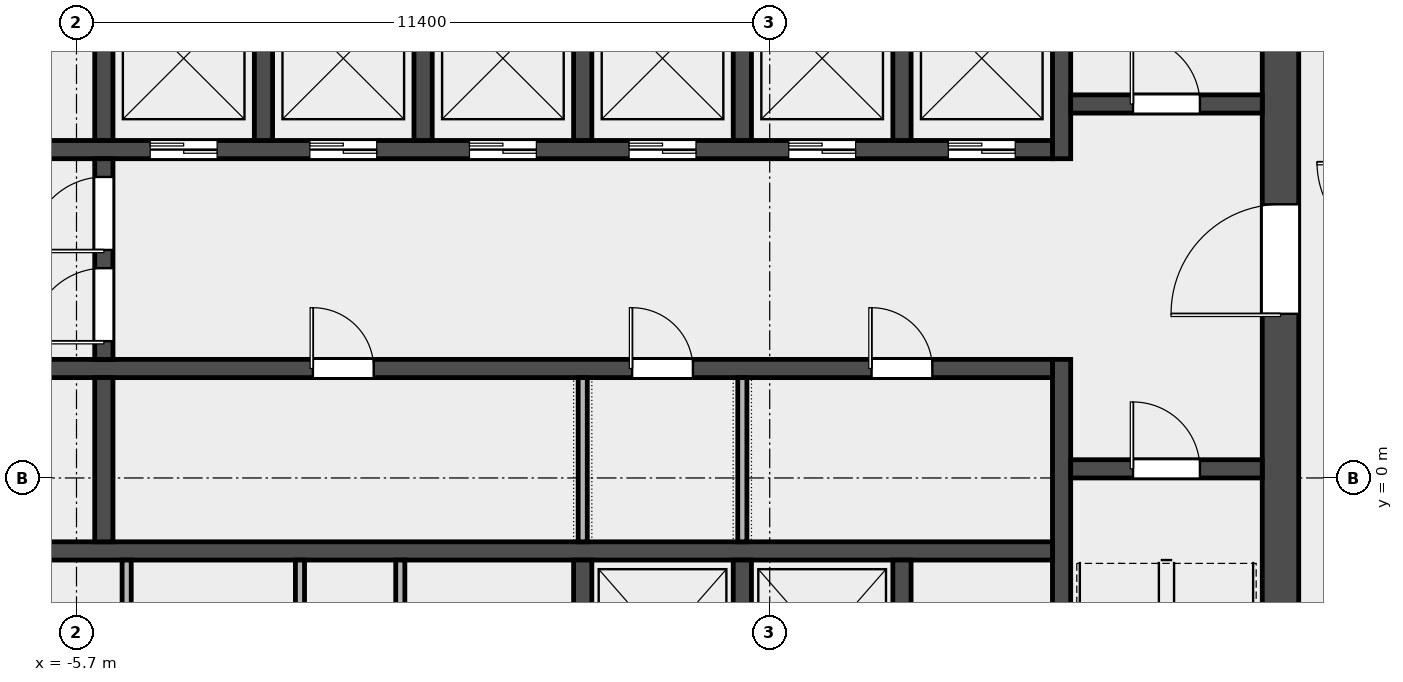
"""IFC4 building model, lengths in metres.
Left out: names, types, materials, properties, quantities, classifications, styles, units other than length and angle.
Written with IfcOpenShell. Run it as: python <this file> out.ifc"""

import sys

from ifc_helpers import new_model, si_unit, direction, frame, frame_2d, origin, place, context, subcontext, project, spatial, rectangle, extrude, element, fill, save


model = new_model("IFC4")
c1 = context("Model", 3, precision=1e-05, world=origin(), true_north=direction((0.0, 1.0)))
c2 = subcontext(c1, "Body", "Model", "MODEL_VIEW")
j1 = project(units=[si_unit("LENGTHUNIT", "METRE"), si_unit("PLANEANGLEUNIT", "RADIAN")], contexts=[c1])
p1 = place(None, origin())
s1 = spatial("IfcSite", under=j1, at=p1, CompositionType="ELEMENT")
p2 = place(p1, origin())
s2 = spatial("IfcBuilding", under=s1, at=p2, CompositionType="ELEMENT")
p3 = place(p2, frame((0.0, 0.0, 295.4)))
s3 = spatial("IfcBuildingStorey", under=s2, at=p3, CompositionType="ELEMENT", Elevation=295.4)
p4 = place(p3, frame((14.1, -6.6, 0.0), z_axis=(0.0, 0.0, 1.0), x_axis=(0.0, 1.0, 0.0)))
e1 = element("IfcWall", 1, at=p4, inside=s3, PredefinedType="SHEAR", context=c2, shape_type="SweptSolid", body=[
    extrude(rectangle(XDim=19.5, YDim=0.6, at=frame_2d((9.75, 0.0))), origin(), (0.0, 0.0, 1.0), 3.7),
])
p5 = place(p4, frame((9.3, 0.0, 0.0)))
e2 = element("IfcOpeningElement", 2, at=p5, cuts=e1, PredefinedType="OPENING", context=c2, shape_type="SweptSolid", body=[
    extrude(rectangle(XDim=1.8, YDim=2.1, at=frame_2d((0.9, 1.05))), frame((0.0, 0.312, 0.0), z_axis=(0.0, -1.0, 0.0), x_axis=(1.0, 0.0, 0.0)), (0.0, 0.0, 1.0), 0.624),
])
p6 = place(p3, frame((10.5, -6.6, 0.0), z_axis=(0.0, 0.0, 1.0), x_axis=(0.0, 1.0, 0.0)))
e3 = element("IfcWall", 3, at=p6, inside=s3, PredefinedType="SHEAR", context=c2, shape_type="SweptSolid", body=[
    extrude(rectangle(XDim=8.55, YDim=0.3, at=frame_2d((4.275, 0.0))), origin(), (0.0, 0.0, 1.0), 3.7),
])
p7 = place(p3, frame((10.5, 5.25, 0.0), z_axis=(0.0, 0.0, 1.0), x_axis=(0.0, 1.0, 0.0)))
e4 = element("IfcWall", 4, at=p7, inside=s3, PredefinedType="SHEAR", context=c2, shape_type="SweptSolid", body=[
    extrude(rectangle(XDim=7.65, YDim=0.3, at=frame_2d((3.825, 0.0))), origin(), (0.0, 0.0, 1.0), 3.7),
])
p8 = place(p3, frame((10.65, 0.15, 0.0), z_axis=(0.0, 0.0, 1.0), x_axis=(1.0, 0.0, 0.0)))
e5 = element("IfcWall", 5, at=p8, inside=s3, PredefinedType="SOLIDWALL", context=c2, shape_type="SweptSolid", body=[
    extrude(rectangle(XDim=3.15, YDim=0.3, at=frame_2d((1.575, 0.0))), origin(), (0.0, 0.0, 1.0), 3.7),
])
p9 = place(p8, frame((1.025, 0.0, 0.0)))
e6 = element("IfcOpeningElement", 6, at=p9, cuts=e5, PredefinedType="OPENING", context=c2, shape_type="SweptSolid", body=[
    extrude(rectangle(XDim=1.1, YDim=2.1, at=frame_2d((0.55, 1.05))), frame((0.0, 0.162, 0.0), z_axis=(0.0, -1.0, 0.0), x_axis=(1.0, 0.0, 0.0)), (0.0, 0.0, 1.0), 0.324),
])
p10 = place(p3, frame((10.65, 6.15, 0.0), z_axis=(0.0, 0.0, 1.0), x_axis=(1.0, 0.0, 0.0)))
e7 = element("IfcWall", 7, at=p10, inside=s3, PredefinedType="SOLIDWALL", context=c2, shape_type="SweptSolid", body=[
    extrude(rectangle(XDim=3.15, YDim=0.3, at=frame_2d((1.575, 0.0))), origin(), (0.0, 0.0, 1.0), 3.7),
])
p11 = place(p10, frame((1.025, 0.0, 0.0)))
e8 = element("IfcOpeningElement", 8, at=p11, cuts=e7, PredefinedType="OPENING", context=c2, shape_type="SweptSolid", body=[
    extrude(rectangle(XDim=1.1, YDim=2.1, at=frame_2d((0.55, 1.05))), frame((0.0, 0.162, 0.0), z_axis=(0.0, -1.0, 0.0), x_axis=(1.0, 0.0, 0.0)), (0.0, 0.0, 1.0), 0.324),
])
p12 = place(p3, frame((-10.35, -1.2, 0.0), z_axis=(0.0, 0.0, 1.0), x_axis=(1.0, 0.0, 0.0)))
e9 = element("IfcWall", 9, at=p12, inside=s3, PredefinedType="SOLIDWALL", context=c2, shape_type="SweptSolid", body=[
    extrude(rectangle(XDim=20.7, YDim=0.3, at=frame_2d((10.35, 0.0))), origin(), (0.0, 0.0, 1.0), 3.7),
])
p13 = place(p3, frame((-10.35, 1.8, 0.0), z_axis=(0.0, 0.0, 1.0), x_axis=(1.0, 0.0, 0.0)))
e10 = element("IfcWall", 10, at=p13, inside=s3, PredefinedType="SOLIDWALL", context=c2, shape_type="SweptSolid", body=[
    extrude(rectangle(XDim=20.7, YDim=0.3, at=frame_2d((10.35, 0.0))), origin(), (0.0, 0.0, 1.0), 3.7),
])
p14 = place(p13, frame((0.512, 0.0, 0.0)))
e11 = element("IfcOpeningElement", 11, at=p14, cuts=e10, PredefinedType="OPENING", context=c2, shape_type="SweptSolid", body=[
    extrude(rectangle(XDim=1.3, YDim=2.1, at=frame_2d((0.65, 1.05))), frame((0.0, 0.162, 0.0), z_axis=(0.0, -1.0, 0.0), x_axis=(1.0, 0.0, 0.0)), (0.0, 0.0, 1.0), 0.324),
])
p15 = place(p13, frame((8.538, 0.0, 0.0)))
e12 = element("IfcOpeningElement", 12, at=p15, cuts=e10, PredefinedType="OPENING", context=c2, shape_type="SweptSolid", body=[
    extrude(rectangle(XDim=1.0, YDim=2.1, at=frame_2d((0.5, 1.05))), frame((0.0, 0.162, 0.0), z_axis=(0.0, -1.0, 0.0), x_axis=(1.0, 0.0, 0.0)), (0.0, 0.0, 1.0), 0.324),
])
p16 = place(p13, frame((13.788, 0.0, 0.0)))
e13 = element("IfcOpeningElement", 13, at=p16, cuts=e10, PredefinedType="OPENING", context=c2, shape_type="SweptSolid", body=[
    extrude(rectangle(XDim=1.0, YDim=2.1, at=frame_2d((0.5, 1.05))), frame((0.0, 0.162, 0.0), z_axis=(0.0, -1.0, 0.0), x_axis=(1.0, 0.0, 0.0)), (0.0, 0.0, 1.0), 0.324),
])
p17 = place(p13, frame((17.725, 0.0, 0.0)))
e14 = element("IfcOpeningElement", 14, at=p17, cuts=e10, PredefinedType="OPENING", context=c2, shape_type="SweptSolid", body=[
    extrude(rectangle(XDim=1.0, YDim=2.1, at=frame_2d((0.5, 1.05))), frame((0.0, 0.162, 0.0), z_axis=(0.0, -1.0, 0.0), x_axis=(1.0, 0.0, 0.0)), (0.0, 0.0, 1.0), 0.324),
])
p18 = place(p3, frame((-10.35, 5.4, 0.0), z_axis=(0.0, 0.0, 1.0), x_axis=(1.0, 0.0, 0.0)))
e15 = element("IfcWall", 15, at=p18, inside=s3, PredefinedType="SOLIDWALL", context=c2, shape_type="SweptSolid", body=[
    extrude(rectangle(XDim=20.7, YDim=0.3, at=frame_2d((10.35, 0.0))), origin(), (0.0, 0.0, 1.0), 3.7),
])
p19 = place(p18, frame((0.512, 0.0, 0.0)))
e16 = element("IfcOpeningElement", 16, at=p19, cuts=e15, PredefinedType="OPENING", context=c2, shape_type="SweptSolid", body=[
    extrude(rectangle(XDim=1.3, YDim=2.1, at=frame_2d((0.65, 1.05))), frame((0.0, 0.162, 0.0), z_axis=(0.0, -1.0, 0.0), x_axis=(1.0, 0.0, 0.0)), (0.0, 0.0, 1.0), 0.324),
])
p20 = place(p18, frame((5.863, 0.0, 0.0)))
e17 = element("IfcOpeningElement", 17, at=p20, cuts=e15, PredefinedType="OPENING", context=c2, shape_type="SweptSolid", body=[
    extrude(rectangle(XDim=1.1, YDim=2.1, at=frame_2d((0.55, 1.05))), frame((0.0, 0.162, 0.0), z_axis=(0.0, -1.0, 0.0), x_axis=(1.0, 0.0, 0.0)), (0.0, 0.0, 1.0), 0.324),
])
p21 = place(p18, frame((8.488, 0.0, 0.0)))
e18 = element("IfcOpeningElement", 18, at=p21, cuts=e15, PredefinedType="OPENING", context=c2, shape_type="SweptSolid", body=[
    extrude(rectangle(XDim=1.1, YDim=2.1, at=frame_2d((0.55, 1.05))), frame((0.0, 0.162, 0.0), z_axis=(0.0, -1.0, 0.0), x_axis=(1.0, 0.0, 0.0)), (0.0, 0.0, 1.0), 0.324),
])
p22 = place(p18, frame((11.113, 0.0, 0.0)))
e19 = element("IfcOpeningElement", 19, at=p22, cuts=e15, PredefinedType="OPENING", context=c2, shape_type="SweptSolid", body=[
    extrude(rectangle(XDim=1.1, YDim=2.1, at=frame_2d((0.55, 1.05))), frame((0.0, 0.162, 0.0), z_axis=(0.0, -1.0, 0.0), x_axis=(1.0, 0.0, 0.0)), (0.0, 0.0, 1.0), 0.324),
])
p23 = place(p18, frame((13.738, 0.0, 0.0)))
e20 = element("IfcOpeningElement", 20, at=p23, cuts=e15, PredefinedType="OPENING", context=c2, shape_type="SweptSolid", body=[
    extrude(rectangle(XDim=1.1, YDim=2.1, at=frame_2d((0.55, 1.05))), frame((0.0, 0.162, 0.0), z_axis=(0.0, -1.0, 0.0), x_axis=(1.0, 0.0, 0.0)), (0.0, 0.0, 1.0), 0.324),
])
p24 = place(p18, frame((16.363, 0.0, 0.0)))
e21 = element("IfcOpeningElement", 21, at=p24, cuts=e15, PredefinedType="OPENING", context=c2, shape_type="SweptSolid", body=[
    extrude(rectangle(XDim=1.1, YDim=2.1, at=frame_2d((0.55, 1.05))), frame((0.0, 0.162, 0.0), z_axis=(0.0, -1.0, 0.0), x_axis=(1.0, 0.0, 0.0)), (0.0, 0.0, 1.0), 0.324),
])
p25 = place(p18, frame((18.988, 0.0, 0.0)))
e22 = element("IfcOpeningElement", 22, at=p25, cuts=e15, PredefinedType="OPENING", context=c2, shape_type="SweptSolid", body=[
    extrude(rectangle(XDim=1.1, YDim=2.1, at=frame_2d((0.55, 1.05))), frame((0.0, 0.162, 0.0), z_axis=(0.0, -1.0, 0.0), x_axis=(1.0, 0.0, 0.0)), (0.0, 0.0, 1.0), 0.324),
])
for number, where, z_axis, x_axis in (
    (23, (-5.25, -1.05, 0.0), (0.0, 0.0, 1.0), (0.0, 1.0, 0.0)),
    (24, (-5.25, 5.55, 0.0), (0.0, 0.0, 1.0), (0.0, 1.0, 0.0)),
    (25, (-2.625, 5.55, 0.0), (0.0, 0.0, 1.0), (0.0, 1.0, 0.0)),
    (26, (0.0, 5.55, 0.0), (0.0, 0.0, 1.0), (0.0, 1.0, 0.0)),
    (27, (2.625, 5.55, 0.0), (0.0, 0.0, 1.0), (0.0, 1.0, 0.0)),
    (28, (5.25, 5.55, 0.0), (0.0, 0.0, 1.0), (0.0, 1.0, 0.0)),
    (29, (7.875, 5.55, 0.0), (0.0, 0.0, 1.0), (0.0, 1.0, 0.0)),
):
    element("IfcWall", number, at=place(p3, frame(where, z_axis=z_axis, x_axis=x_axis)), inside=s3, PredefinedType="SOLIDWALL", context=c2, shape_type="SweptSolid", body=[
        extrude(rectangle(XDim=2.7, YDim=0.3, at=frame_2d((1.35, 0.0))), origin(), (0.0, 0.0, 1.0), 3.7),
    ])
p26 = place(p3, frame((-5.25, 1.95, 0.0), z_axis=(0.0, 0.0, 1.0), x_axis=(0.0, 1.0, 0.0)))
e30 = element("IfcWall", 30, at=p26, inside=s3, PredefinedType="SOLIDWALL", context=c2, shape_type="SweptSolid", body=[
    extrude(rectangle(XDim=3.3, YDim=0.3, at=frame_2d((1.65, 0.0))), origin(), (0.0, 0.0, 1.0), 3.7),
])
p27 = place(p26, frame((0.3, 0.0, 0.0)))
e31 = element("IfcOpeningElement", 31, at=p27, cuts=e30, PredefinedType="OPENING", context=c2, shape_type="SweptSolid", body=[
    extrude(rectangle(XDim=1.2, YDim=2.1, at=frame_2d((0.6, 1.05))), frame((0.0, 0.162, 0.0), z_axis=(0.0, -1.0, 0.0), x_axis=(1.0, 0.0, 0.0)), (0.0, 0.0, 1.0), 0.324),
])
p28 = place(p26, frame((1.8, 0.0, 0.0)))
e32 = element("IfcOpeningElement", 32, at=p28, cuts=e30, PredefinedType="OPENING", context=c2, shape_type="SweptSolid", body=[
    extrude(rectangle(XDim=1.2, YDim=2.1, at=frame_2d((0.6, 1.05))), frame((0.0, 0.162, 0.0), z_axis=(0.0, -1.0, 0.0), x_axis=(1.0, 0.0, 0.0)), (0.0, 0.0, 1.0), 0.324),
])
for number, where, z_axis, x_axis in (
    (33, (2.625, -4.05, 0.0), (0.0, 0.0, 1.0), (0.0, 1.0, 0.0)),
    (34, (5.25, -4.05, 0.0), (0.0, 0.0, 1.0), (0.0, 1.0, 0.0)),
    (35, (7.875, -4.05, 0.0), (0.0, 0.0, 1.0), (0.0, 1.0, 0.0)),
):
    element("IfcWall", number, at=place(p3, frame(where, z_axis=z_axis, x_axis=x_axis)), inside=s3, PredefinedType="SOLIDWALL", context=c2, shape_type="SweptSolid", body=[
        extrude(rectangle(XDim=2.7, YDim=0.3, at=frame_2d((1.35, 0.0))), origin(), (0.0, 0.0, 1.0), 3.7),
    ])
for number, where, z_axis, x_axis in (
    (36, (-4.875, -4.425, 0.0), (0.0, 0.0, 1.0), (0.0, 1.0, 0.0)),
    (37, (-2.025, -4.425, 0.0), (0.0, 0.0, 1.0), (0.0, 1.0, 0.0)),
):
    element("IfcWall", number, at=place(p3, frame(where, z_axis=z_axis, x_axis=x_axis)), inside=s3, PredefinedType="PARTITIONING", context=c2, shape_type="SweptSolid", body=[
        extrude(rectangle(XDim=3.075, YDim=0.15, at=frame_2d((1.538, 0.0))), origin(), (0.0, 0.0, 1.0), 3.7),
    ])
p29 = place(p3, frame((-0.375, -6.6, 0.0), z_axis=(0.0, 0.0, 1.0), x_axis=(0.0, 1.0, 0.0)))
e38 = element("IfcWall", 38, at=p29, inside=s3, PredefinedType="PARTITIONING", context=c2, shape_type="SweptSolid", body=[
    extrude(rectangle(XDim=5.25, YDim=0.15, at=frame_2d((2.625, 0.0))), origin(), (0.0, 0.0, 1.0), 3.7),
])
for number, where, z_axis, x_axis in (
    (39, (2.625, -1.05, 0.0), (0.0, 0.0, 1.0), (0.0, 1.0, 0.0)),
    (40, (5.25, -1.05, 0.0), (0.0, 0.0, 1.0), (0.0, 1.0, 0.0)),
):
    element("IfcWall", number, at=place(p3, frame(where, z_axis=z_axis, x_axis=x_axis)), inside=s3, PredefinedType="PARTITIONING", context=c2, shape_type="SweptSolid", body=[
        extrude(rectangle(XDim=2.7, YDim=0.15, at=frame_2d((1.35, 0.0))), origin(), (0.0, 0.0, 1.0), 3.7),
    ])
p30 = place(p9, origin())
e41 = element("IfcDoor", 41, at=p30, inside=s3, OperationType="SINGLE_SWING_RIGHT", PredefinedType="DOOR", context=c2, shape_type="SweptSolid", body=[
    extrude(rectangle(XDim=1.1, YDim=2.1, at=frame_2d((0.55, 1.05))), frame((0.0, 0.025, 0.0), z_axis=(0.0, -1.0, 0.0), x_axis=(1.0, 0.0, 0.0)), (0.0, 0.0, 1.0), 0.05),
])
fill(e6, e41)
p31 = place(p11, origin())
e42 = element("IfcDoor", 42, at=p31, inside=s3, OperationType="SINGLE_SWING_RIGHT", PredefinedType="DOOR", context=c2, shape_type="SweptSolid", body=[
    extrude(rectangle(XDim=1.1, YDim=2.1, at=frame_2d((0.55, 1.05))), frame((0.0, 0.025, 0.0), z_axis=(0.0, -1.0, 0.0), x_axis=(1.0, 0.0, 0.0)), (0.0, 0.0, 1.0), 0.05),
])
fill(e8, e42)
p32 = place(p5, origin())
e43 = element("IfcDoor", 43, at=p32, inside=s3, OperationType="DOUBLE_DOOR_SINGLE_SWING", PredefinedType="DOOR", context=c2, shape_type="SweptSolid", body=[
    extrude(rectangle(XDim=1.8, YDim=2.1, at=frame_2d((0.9, 1.05))), frame((0.0, 0.025, 0.0), z_axis=(0.0, -1.0, 0.0), x_axis=(1.0, 0.0, 0.0)), (0.0, 0.0, 1.0), 0.05),
])
fill(e2, e43)
p33 = place(p27, origin())
e44 = element("IfcDoor", 44, at=p33, inside=s3, OperationType="SINGLE_SWING_LEFT", PredefinedType="DOOR", context=c2, shape_type="SweptSolid", body=[
    extrude(rectangle(XDim=1.2, YDim=2.1, at=frame_2d((0.6, 1.05))), frame((0.0, 0.025, 0.0), z_axis=(0.0, -1.0, 0.0), x_axis=(1.0, 0.0, 0.0)), (0.0, 0.0, 1.0), 0.05),
])
fill(e31, e44)
p34 = place(p28, origin())
e45 = element("IfcDoor", 45, at=p34, inside=s3, OperationType="SINGLE_SWING_RIGHT", PredefinedType="DOOR", context=c2, shape_type="SweptSolid", body=[
    extrude(rectangle(XDim=1.2, YDim=2.1, at=frame_2d((0.6, 1.05))), frame((0.0, 0.025, 0.0), z_axis=(0.0, -1.0, 0.0), x_axis=(1.0, 0.0, 0.0)), (0.0, 0.0, 1.0), 0.05),
])
fill(e32, e45)
p35 = place(p20, origin())
e46 = element("IfcDoor", 46, at=p35, inside=s3, OperationType="DOUBLE_DOOR_SLIDING", PredefinedType="DOOR", context=c2, shape_type="SweptSolid", body=[
    extrude(rectangle(XDim=1.1, YDim=2.1, at=frame_2d((0.55, 1.05))), frame((0.0, 0.025, 0.0), z_axis=(0.0, -1.0, 0.0), x_axis=(1.0, 0.0, 0.0)), (0.0, 0.0, 1.0), 0.05),
])
fill(e17, e46)
p36 = place(p21, origin())
e47 = element("IfcDoor", 47, at=p36, inside=s3, OperationType="DOUBLE_DOOR_SLIDING", PredefinedType="DOOR", context=c2, shape_type="SweptSolid", body=[
    extrude(rectangle(XDim=1.1, YDim=2.1, at=frame_2d((0.55, 1.05))), frame((0.0, 0.025, 0.0), z_axis=(0.0, -1.0, 0.0), x_axis=(1.0, 0.0, 0.0)), (0.0, 0.0, 1.0), 0.05),
])
fill(e18, e47)
p37 = place(p22, origin())
e48 = element("IfcDoor", 48, at=p37, inside=s3, OperationType="DOUBLE_DOOR_SLIDING", PredefinedType="DOOR", context=c2, shape_type="SweptSolid", body=[
    extrude(rectangle(XDim=1.1, YDim=2.1, at=frame_2d((0.55, 1.05))), frame((0.0, 0.025, 0.0), z_axis=(0.0, -1.0, 0.0), x_axis=(1.0, 0.0, 0.0)), (0.0, 0.0, 1.0), 0.05),
])
fill(e19, e48)
p38 = place(p23, origin())
e49 = element("IfcDoor", 49, at=p38, inside=s3, OperationType="DOUBLE_DOOR_SLIDING", PredefinedType="DOOR", context=c2, shape_type="SweptSolid", body=[
    extrude(rectangle(XDim=1.1, YDim=2.1, at=frame_2d((0.55, 1.05))), frame((0.0, 0.025, 0.0), z_axis=(0.0, -1.0, 0.0), x_axis=(1.0, 0.0, 0.0)), (0.0, 0.0, 1.0), 0.05),
])
fill(e20, e49)
p39 = place(p24, origin())
e50 = element("IfcDoor", 50, at=p39, inside=s3, OperationType="DOUBLE_DOOR_SLIDING", PredefinedType="DOOR", context=c2, shape_type="SweptSolid", body=[
    extrude(rectangle(XDim=1.1, YDim=2.1, at=frame_2d((0.55, 1.05))), frame((0.0, 0.025, 0.0), z_axis=(0.0, -1.0, 0.0), x_axis=(1.0, 0.0, 0.0)), (0.0, 0.0, 1.0), 0.05),
])
fill(e21, e50)
p40 = place(p25, origin())
e51 = element("IfcDoor", 51, at=p40, inside=s3, OperationType="DOUBLE_DOOR_SLIDING", PredefinedType="DOOR", context=c2, shape_type="SweptSolid", body=[
    extrude(rectangle(XDim=1.1, YDim=2.1, at=frame_2d((0.55, 1.05))), frame((0.0, 0.025, 0.0), z_axis=(0.0, -1.0, 0.0), x_axis=(1.0, 0.0, 0.0)), (0.0, 0.0, 1.0), 0.05),
])
fill(e22, e51)
p41 = place(p15, origin())
e52 = element("IfcDoor", 52, at=p41, inside=s3, OperationType="SINGLE_SWING_LEFT", PredefinedType="DOOR", context=c2, shape_type="SweptSolid", body=[
    extrude(rectangle(XDim=1.0, YDim=2.1, at=frame_2d((0.5, 1.05))), frame((0.0, 0.025, 0.0), z_axis=(0.0, -1.0, 0.0), x_axis=(1.0, 0.0, 0.0)), (0.0, 0.0, 1.0), 0.05),
])
fill(e12, e52)
p42 = place(p16, origin())
e53 = element("IfcDoor", 53, at=p42, inside=s3, OperationType="SINGLE_SWING_LEFT", PredefinedType="DOOR", context=c2, shape_type="SweptSolid", body=[
    extrude(rectangle(XDim=1.0, YDim=2.1, at=frame_2d((0.5, 1.05))), frame((0.0, 0.025, 0.0), z_axis=(0.0, -1.0, 0.0), x_axis=(1.0, 0.0, 0.0)), (0.0, 0.0, 1.0), 0.05),
])
fill(e13, e53)
p43 = place(p17, origin())
e54 = element("IfcDoor", 54, at=p43, inside=s3, OperationType="SINGLE_SWING_LEFT", PredefinedType="DOOR", context=c2, shape_type="SweptSolid", body=[
    extrude(rectangle(XDim=1.0, YDim=2.1, at=frame_2d((0.5, 1.05))), frame((0.0, 0.025, 0.0), z_axis=(0.0, -1.0, 0.0), x_axis=(1.0, 0.0, 0.0)), (0.0, 0.0, 1.0), 0.05),
])
fill(e14, e54)
save(model, sys.argv[1])
